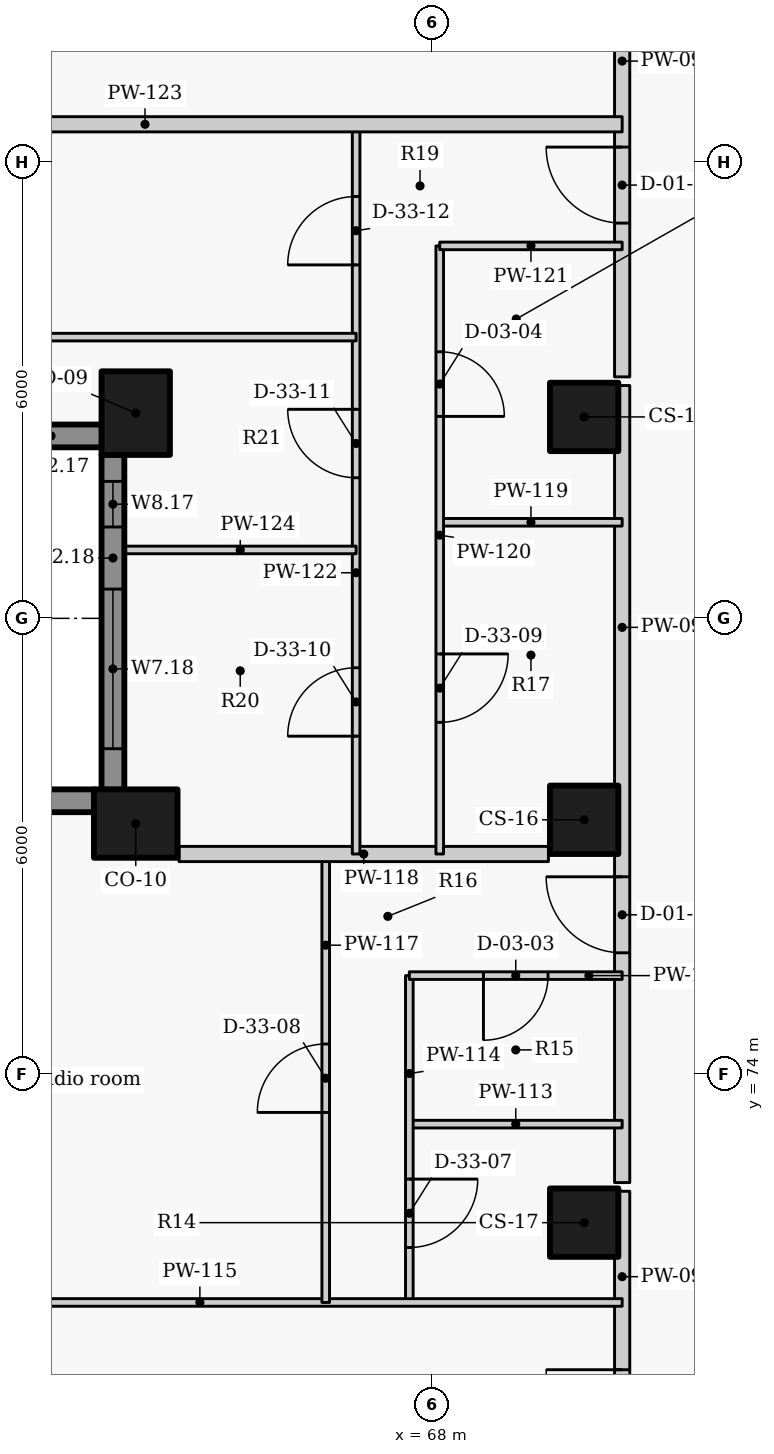
"""IFC4 building model, lengths in metres.
Left out: names, types, materials, properties, quantities, classifications, styles, units other than length and angle.
Written with IfcOpenShell. Run it as: python <this file> out.ifc"""

import sys

from ifc_helpers import new_model, si_unit, direction, frame, frame_2d, origin, origin_2d, place, context, subcontext, project, spatial, rectangle, extrude, element, fill, save


model = new_model("IFC4")
c1 = context("Model", 3, precision=1e-05, world=origin(), true_north=direction((0.0, 1.0)))
c2 = subcontext(c1, "Body", "Model", "MODEL_VIEW")
j1 = project(units=[si_unit("LENGTHUNIT", "METRE"), si_unit("PLANEANGLEUNIT", "RADIAN")], contexts=[c1])
p1 = place(None, origin())
s1 = spatial("IfcSite", under=j1, at=p1, CompositionType="ELEMENT")
p2 = place(p1, origin())
s2 = spatial("IfcBuilding", under=s1, at=p2, CompositionType="ELEMENT")
p3 = place(p2, frame((0.0, 0.0, 239.4)))
s3 = spatial("IfcBuildingStorey", under=s2, at=p3, CompositionType="ELEMENT", Elevation=239.4)
for number, where, z_axis, x_axis in (
    (1, (64.101, 82.7, 0.0), (0.0, 0.0, 1.0), (0.0, -1.0, 0.0)),
    (2, (64.101, 77.3, 0.0), (0.0, 0.0, 1.0), (-1.0, 0.0, 0.0)),
):
    element("IfcColumn", number, at=place(p3, frame(where, z_axis=z_axis, x_axis=x_axis)), inside=s3, PredefinedType="COLUMN", context=c2, shape_type="SweptSolid", body=[
        extrude(rectangle(XDim=1.1, YDim=0.9, at=origin_2d()), origin(), (0.0, 0.0, 1.0), 3.3),
    ])
for number, where, z_axis, x_axis in (
    (3, (70.0, 82.65, 0.0), (0.0, 0.0, 1.0), (0.0, -1.0, 0.0)),
    (4, (70.0, 77.35, 0.0), (0.0, 0.0, 1.0), (0.0, -1.0, 0.0)),
    (5, (70.0, 72.05, 0.0), (0.0, 0.0, 1.0), (0.0, -1.0, 0.0)),
):
    element("IfcColumn", number, at=place(p3, frame(where, z_axis=z_axis, x_axis=x_axis)), inside=s3, PredefinedType="COLUMN", context=c2, shape_type="SweptSolid", body=[
        extrude(rectangle(XDim=0.9, YDim=0.9, at=origin_2d()), origin(), (0.0, 0.0, 1.0), 3.3),
    ])
p4 = place(p3, frame((59.282, 82.4, 0.0), z_axis=(0.0, 0.0, 1.0), x_axis=(1.0, 0.0, 0.0)))
e6 = element("IfcWall", 6, at=p4, inside=s3, PredefinedType="SOLIDWALL", context=c2, shape_type="SweptSolid", body=[
    extrude(rectangle(XDim=4.373, YDim=0.3, at=frame_2d((2.186, 0.0))), origin(), (0.0, 0.0, 1.0), 2.425),
])
p5 = place(p4, frame((1.436, 0.0, 0.9)))
e7 = element("IfcOpeningElement", 7, at=p5, cuts=e6, PredefinedType="OPENING", context=c2, shape_type="SweptSolid", body=[
    extrude(rectangle(XDim=1.5, YDim=1.1, at=frame_2d((0.75, 0.55))), frame((0.0, 0.16, 0.0), z_axis=(0.0, -1.0, 0.0), x_axis=(1.0, 0.0, 0.0)), (0.0, 0.0, 1.0), 0.32),
])
p6 = place(p3, frame((63.801, 82.154, 0.0), z_axis=(0.0, 0.0, 1.0), x_axis=(0.0, -1.0, 0.0)))
e8 = element("IfcWall", 8, at=p6, inside=s3, PredefinedType="SOLIDWALL", context=c2, shape_type="SweptSolid", body=[
    extrude(rectangle(XDim=4.408, YDim=0.3, at=frame_2d((2.204, 0.0))), origin(), (0.0, 0.0, 1.0), 2.425),
])
p7 = place(p6, frame((0.352, 0.0, 0.9)))
e9 = element("IfcOpeningElement", 9, at=p7, cuts=e8, PredefinedType="OPENING", context=c2, shape_type="SweptSolid", body=[
    extrude(rectangle(XDim=0.6, YDim=1.1, at=frame_2d((0.3, 0.55))), frame((0.0, 0.16, 0.0), z_axis=(0.0, -1.0, 0.0), x_axis=(1.0, 0.0, 0.0)), (0.0, 0.0, 1.0), 0.32),
])
p8 = place(p6, frame((1.769, 0.0, 0.9)))
e10 = element("IfcOpeningElement", 10, at=p8, cuts=e8, PredefinedType="OPENING", context=c2, shape_type="SweptSolid", body=[
    extrude(rectangle(XDim=2.1, YDim=1.1, at=frame_2d((1.05, 0.55))), frame((0.0, 0.16, 0.0), z_axis=(0.0, -1.0, 0.0), x_axis=(1.0, 0.0, 0.0)), (0.0, 0.0, 1.0), 0.32),
])
p9 = place(p3, frame((63.554, 77.6, 0.0), z_axis=(0.0, 0.0, 1.0), x_axis=(-1.0, 0.0, 0.0)))
e11 = element("IfcWall", 11, at=p9, inside=s3, PredefinedType="SOLIDWALL", context=c2, shape_type="SweptSolid", body=[
    extrude(rectangle(XDim=4.272, YDim=0.3, at=frame_2d((2.136, 0.0))), origin(), (0.0, 0.0, 1.0), 2.425),
])
p10 = place(p3, frame((70.5, 68.227, 0.0), z_axis=(0.0, 0.0, 1.0), x_axis=(0.0, 1.0, 0.0)))
e12 = element("IfcWall", 12, at=p10, inside=s3, PredefinedType="PARTITIONING", context=c2, shape_type="SweptSolid", body=[
    extrude(rectangle(XDim=4.236, YDim=0.2, at=frame_2d((2.118, 0.0))), origin(), (0.0, 0.0, 1.0), 3.025),
])
p11 = place(p10, frame((0.888, 0.0, 0.0)))
e13 = element("IfcOpeningElement", 13, at=p11, cuts=e12, PredefinedType="OPENING", context=c2, shape_type="SweptSolid", body=[
    extrude(rectangle(XDim=1.0, YDim=2.1, at=frame_2d((0.5, 1.05))), frame((0.0, 0.11, 0.0), z_axis=(0.0, -1.0, 0.0), x_axis=(1.0, 0.0, 0.0)), (0.0, 0.0, 1.0), 0.22),
])
p12 = place(p3, frame((70.5, 72.577, 0.0), z_axis=(0.0, 0.0, 1.0), x_axis=(0.0, 1.0, 0.0)))
e14 = element("IfcWall", 14, at=p12, inside=s3, PredefinedType="PARTITIONING", context=c2, shape_type="SweptSolid", body=[
    extrude(rectangle(XDim=10.486, YDim=0.2, at=frame_2d((5.243, 0.0))), origin(), (0.0, 0.0, 1.0), 3.025),
])
p13 = place(p12, frame((3.023, 0.0, 0.0)))
e15 = element("IfcOpeningElement", 15, at=p13, cuts=e14, PredefinedType="OPENING", context=c2, shape_type="SweptSolid", body=[
    extrude(rectangle(XDim=1.0, YDim=2.1, at=frame_2d((0.5, 1.05))), frame((0.0, 0.11, 0.0), z_axis=(0.0, -1.0, 0.0), x_axis=(1.0, 0.0, 0.0)), (0.0, 0.0, 1.0), 0.22),
])
p14 = place(p3, frame((70.5, 83.177, 0.0), z_axis=(0.0, 0.0, 1.0), x_axis=(0.0, 1.0, 0.0)))
e16 = element("IfcWall", 16, at=p14, inside=s3, PredefinedType="PARTITIONING", context=c2, shape_type="SweptSolid", body=[
    extrude(rectangle(XDim=5.186, YDim=0.2, at=frame_2d((2.593, 0.0))), origin(), (0.0, 0.0, 1.0), 3.025),
])
p15 = place(p14, frame((2.023, 0.0, 0.0)))
e17 = element("IfcOpeningElement", 17, at=p15, cuts=e16, PredefinedType="OPENING", context=c2, shape_type="SweptSolid", body=[
    extrude(rectangle(XDim=1.0, YDim=2.1, at=frame_2d((0.5, 1.05))), frame((0.0, 0.11, 0.0), z_axis=(0.0, -1.0, 0.0), x_axis=(1.0, 0.0, 0.0)), (0.0, 0.0, 1.0), 0.22),
])
p16 = place(p3, frame((67.7, 73.346, 0.0), z_axis=(0.0, 0.0, 1.0), x_axis=(1.0, 0.0, 0.0)))
e18 = element("IfcWall", 18, at=p16, inside=s3, PredefinedType="PARTITIONING", context=c2, shape_type="SweptSolid", body=[
    extrude(rectangle(XDim=2.8, YDim=0.1, at=frame_2d((1.4, 0.0))), origin(), (0.0, 0.0, 1.0), 2.505),
])
p17 = place(p3, frame((67.7, 75.3, 0.0), z_axis=(0.0, 0.0, 1.0), x_axis=(0.0, -1.0, 0.0)))
e19 = element("IfcWall", 19, at=p17, inside=s3, PredefinedType="PARTITIONING", context=c2, shape_type="SweptSolid", body=[
    extrude(rectangle(XDim=4.3, YDim=0.1, at=frame_2d((2.15, 0.0))), origin(), (0.0, 0.0, 1.0), 3.025),
])
p18 = place(p17, frame((2.677, 0.0, 0.0)))
e20 = element("IfcOpeningElement", 20, at=p18, cuts=e19, PredefinedType="OPENING", context=c2, shape_type="SweptSolid", body=[
    extrude(rectangle(XDim=0.9, YDim=2.1, at=frame_2d((0.45, 1.05))), frame((0.0, 0.06, 0.0), z_axis=(0.0, -1.0, 0.0), x_axis=(1.0, 0.0, 0.0)), (0.0, 0.0, 1.0), 0.12),
])
p19 = place(p3, frame((59.389, 71.0, 0.0), z_axis=(0.0, 0.0, 1.0), x_axis=(1.0, 0.0, 0.0)))
e21 = element("IfcWall", 21, at=p19, inside=s3, PredefinedType="PARTITIONING", context=c2, shape_type="SweptSolid", body=[
    extrude(rectangle(XDim=11.111, YDim=0.1, at=frame_2d((5.556, 0.0))), origin(), (0.0, 0.0, 1.0), 2.405),
])
p20 = place(p3, frame((70.5, 75.3, 0.0), z_axis=(0.0, 0.0, 1.0), x_axis=(-1.0, 0.0, 0.0)))
e22 = element("IfcWall", 22, at=p20, inside=s3, PredefinedType="PARTITIONING", context=c2, shape_type="SweptSolid", body=[
    extrude(rectangle(XDim=2.8, YDim=0.1, at=frame_2d((1.4, 0.0))), origin(), (0.0, 0.0, 1.0), 2.505),
])
p21 = place(p20, frame((0.975, 0.0, 0.0)))
e23 = element("IfcOpeningElement", 23, at=p21, cuts=e22, PredefinedType="OPENING", context=c2, shape_type="SweptSolid", body=[
    extrude(rectangle(XDim=0.85, YDim=2.1, at=frame_2d((0.425, 1.05))), frame((0.0, 0.06, 0.0), z_axis=(0.0, -1.0, 0.0), x_axis=(1.0, 0.0, 0.0)), (0.0, 0.0, 1.0), 0.12),
])
p22 = place(p3, frame((66.6, 71.0, 0.0), z_axis=(0.0, 0.0, 1.0), x_axis=(0.0, 1.0, 0.0)))
e24 = element("IfcWall", 24, at=p22, inside=s3, PredefinedType="PARTITIONING", context=c2, shape_type="SweptSolid", body=[
    extrude(rectangle(XDim=5.9, YDim=0.1, at=frame_2d((2.95, 0.0))), origin(), (0.0, 0.0, 1.0), 3.025),
])
p23 = place(p22, frame((2.5, 0.0, 0.0)))
e25 = element("IfcOpeningElement", 25, at=p23, cuts=e24, PredefinedType="OPENING", context=c2, shape_type="SweptSolid", body=[
    extrude(rectangle(XDim=0.9, YDim=2.1, at=frame_2d((0.45, 1.05))), frame((0.0, 0.06, 0.0), z_axis=(0.0, -1.0, 0.0), x_axis=(1.0, 0.0, 0.0)), (0.0, 0.0, 1.0), 0.12),
])
p24 = place(p3, frame((64.67, 76.9, 0.0), z_axis=(0.0, 0.0, 1.0), x_axis=(1.0, 0.0, 0.0)))
e26 = element("IfcWall", 26, at=p24, inside=s3, PredefinedType="PARTITIONING", context=c2, shape_type="SweptSolid", body=[
    extrude(rectangle(XDim=4.86, YDim=0.2, at=frame_2d((2.43, 0.0))), origin(), (0.0, 0.0, 1.0), 3.025),
])
p25 = place(p3, frame((68.1, 81.264, 0.0), z_axis=(0.0, 0.0, 1.0), x_axis=(1.0, 0.0, 0.0)))
e27 = element("IfcWall", 27, at=p25, inside=s3, PredefinedType="PARTITIONING", context=c2, shape_type="SweptSolid", body=[
    extrude(rectangle(XDim=2.4, YDim=0.1, at=frame_2d((1.2, 0.0))), origin(), (0.0, 0.0, 1.0), 2.505),
])
p26 = place(p3, frame((68.1, 84.9, 0.0), z_axis=(0.0, 0.0, 1.0), x_axis=(0.0, -1.0, 0.0)))
e28 = element("IfcWall", 28, at=p26, inside=s3, PredefinedType="PARTITIONING", context=c2, shape_type="SweptSolid", body=[
    extrude(rectangle(XDim=8.0, YDim=0.1, at=frame_2d((4.0, 0.0))), origin(), (0.0, 0.0, 1.0), 3.025),
])
p27 = place(p26, frame((5.368, 0.0, 0.0)))
e29 = element("IfcOpeningElement", 29, at=p27, cuts=e28, PredefinedType="OPENING", context=c2, shape_type="SweptSolid", body=[
    extrude(rectangle(XDim=0.9, YDim=2.1, at=frame_2d((0.45, 1.05))), frame((0.0, 0.06, 0.0), z_axis=(0.0, -1.0, 0.0), x_axis=(1.0, 0.0, 0.0)), (0.0, 0.0, 1.0), 0.12),
])
p28 = place(p26, frame((1.393, 0.0, 0.0)))
e30 = element("IfcOpeningElement", 30, at=p28, cuts=e28, PredefinedType="OPENING", context=c2, shape_type="SweptSolid", body=[
    extrude(rectangle(XDim=0.85, YDim=2.1, at=frame_2d((0.425, 1.05))), frame((0.0, 0.06, 0.0), z_axis=(0.0, -1.0, 0.0), x_axis=(1.0, 0.0, 0.0)), (0.0, 0.0, 1.0), 0.12),
])
p29 = place(p3, frame((68.1, 84.9, 0.0), z_axis=(0.0, 0.0, 1.0), x_axis=(1.0, 0.0, 0.0)))
e31 = element("IfcWall", 31, at=p29, inside=s3, PredefinedType="PARTITIONING", context=c2, shape_type="SweptSolid", body=[
    extrude(rectangle(XDim=2.4, YDim=0.1, at=frame_2d((1.2, 0.0))), origin(), (0.0, 0.0, 1.0), 2.505),
])
p30 = place(p3, frame((67.0, 76.9, 0.0), z_axis=(0.0, 0.0, 1.0), x_axis=(0.0, 1.0, 0.0)))
e32 = element("IfcWall", 32, at=p30, inside=s3, PredefinedType="PARTITIONING", context=c2, shape_type="SweptSolid", body=[
    extrude(rectangle(XDim=9.6, YDim=0.1, at=frame_2d((4.8, 0.0))), origin(), (0.0, 0.0, 1.0), 3.025),
])
p31 = place(p30, frame((1.55, 0.0, 0.0)))
e33 = element("IfcOpeningElement", 33, at=p31, cuts=e32, PredefinedType="OPENING", context=c2, shape_type="SweptSolid", body=[
    extrude(rectangle(XDim=0.9, YDim=2.1, at=frame_2d((0.45, 1.05))), frame((0.0, 0.06, 0.0), z_axis=(0.0, -1.0, 0.0), x_axis=(1.0, 0.0, 0.0)), (0.0, 0.0, 1.0), 0.12),
])
p32 = place(p30, frame((4.95, 0.0, 0.0)))
e34 = element("IfcOpeningElement", 34, at=p32, cuts=e32, PredefinedType="OPENING", context=c2, shape_type="SweptSolid", body=[
    extrude(rectangle(XDim=0.9, YDim=2.1, at=frame_2d((0.45, 1.05))), frame((0.0, 0.06, 0.0), z_axis=(0.0, -1.0, 0.0), x_axis=(1.0, 0.0, 0.0)), (0.0, 0.0, 1.0), 0.12),
])
p33 = place(p30, frame((7.75, 0.0, 0.0)))
e35 = element("IfcOpeningElement", 35, at=p33, cuts=e32, PredefinedType="OPENING", context=c2, shape_type="SweptSolid", body=[
    extrude(rectangle(XDim=0.9, YDim=2.1, at=frame_2d((0.45, 1.05))), frame((0.0, 0.06, 0.0), z_axis=(0.0, -1.0, 0.0), x_axis=(1.0, 0.0, 0.0)), (0.0, 0.0, 1.0), 0.12),
])
p34 = place(p3, frame((57.945, 86.5, 0.0), z_axis=(0.0, 0.0, 1.0), x_axis=(1.0, 0.0, 0.0)))
e36 = element("IfcWall", 36, at=p34, inside=s3, PredefinedType="PARTITIONING", context=c2, shape_type="SweptSolid", body=[
    extrude(rectangle(XDim=12.555, YDim=0.2, at=frame_2d((6.277, 0.0))), origin(), (0.0, 0.0, 1.0), 2.405),
])
p35 = place(p3, frame((63.95, 80.9, 0.0), z_axis=(0.0, 0.0, 1.0), x_axis=(1.0, 0.0, 0.0)))
e37 = element("IfcWall", 37, at=p35, inside=s3, PredefinedType="PARTITIONING", context=c2, shape_type="SweptSolid", body=[
    extrude(rectangle(XDim=3.05, YDim=0.1, at=frame_2d((1.525, 0.0))), origin(), (0.0, 0.0, 1.0), 2.405),
])
p36 = place(p3, frame((56.329, 83.7, 0.0), z_axis=(0.0, 0.0, 1.0), x_axis=(1.0, 0.0, 0.0)))
e38 = element("IfcWall", 38, at=p36, inside=s3, PredefinedType="PARTITIONING", context=c2, shape_type="SweptSolid", body=[
    extrude(rectangle(XDim=10.671, YDim=0.1, at=frame_2d((5.336, 0.0))), origin(), (0.0, 0.0, 1.0), 2.405),
])
p37 = place(p7, origin())
e39 = element("IfcWindow", 39, at=p37, inside=s3, PartitioningType="SINGLE_PANEL", PredefinedType="WINDOW", context=c2, shape_type="SweptSolid", body=[
    extrude(rectangle(XDim=0.6, YDim=1.1, at=frame_2d((0.3, 0.55))), frame((0.0, 0.03, 0.0), z_axis=(0.0, -1.0, 0.0), x_axis=(1.0, 0.0, 0.0)), (0.0, 0.0, 1.0), 0.06),
])
fill(e9, e39)
p38 = place(p8, origin())
e40 = element("IfcWindow", 40, at=p38, inside=s3, PartitioningType="SINGLE_PANEL", PredefinedType="WINDOW", context=c2, shape_type="SweptSolid", body=[
    extrude(rectangle(XDim=2.1, YDim=1.1, at=frame_2d((1.05, 0.55))), frame((0.0, 0.03, 0.0), z_axis=(0.0, -1.0, 0.0), x_axis=(1.0, 0.0, 0.0)), (0.0, 0.0, 1.0), 0.06),
])
fill(e10, e40)
p39 = place(p13, origin())
e41 = element("IfcDoor", 41, at=p39, inside=s3, OperationType="SINGLE_SWING_RIGHT", PredefinedType="DOOR", context=c2, shape_type="SweptSolid", body=[
    extrude(rectangle(XDim=1.0, YDim=2.1, at=frame_2d((0.5, 1.05))), frame((0.0, 0.025, 0.0), z_axis=(0.0, -1.0, 0.0), x_axis=(1.0, 0.0, 0.0)), (0.0, 0.0, 1.0), 0.05),
])
fill(e15, e41)
p40 = place(p18, origin())
e42 = element("IfcDoor", 42, at=p40, inside=s3, OperationType="SINGLE_SWING_LEFT", PredefinedType="DOOR", context=c2, shape_type="SweptSolid", body=[
    extrude(rectangle(XDim=0.9, YDim=2.1, at=frame_2d((0.45, 1.05))), frame((0.0, 0.025, 0.0), z_axis=(0.0, -1.0, 0.0), x_axis=(1.0, 0.0, 0.0)), (0.0, 0.0, 1.0), 0.05),
])
fill(e20, e42)
p41 = place(p21, origin())
e43 = element("IfcDoor", 43, at=p41, inside=s3, OperationType="SINGLE_SWING_RIGHT", PredefinedType="DOOR", context=c2, shape_type="SweptSolid", body=[
    extrude(rectangle(XDim=0.85, YDim=2.1, at=frame_2d((0.425, 1.05))), frame((0.0, 0.025, 0.0), z_axis=(0.0, -1.0, 0.0), x_axis=(1.0, 0.0, 0.0)), (0.0, 0.0, 1.0), 0.05),
])
fill(e23, e43)
p42 = place(p23, origin())
e44 = element("IfcDoor", 44, at=p42, inside=s3, OperationType="SINGLE_SWING_LEFT", PredefinedType="DOOR", context=c2, shape_type="SweptSolid", body=[
    extrude(rectangle(XDim=0.9, YDim=2.1, at=frame_2d((0.45, 1.05))), frame((0.0, 0.025, 0.0), z_axis=(0.0, -1.0, 0.0), x_axis=(1.0, 0.0, 0.0)), (0.0, 0.0, 1.0), 0.05),
])
fill(e25, e44)
p43 = place(p15, origin())
e45 = element("IfcDoor", 45, at=p43, inside=s3, OperationType="SINGLE_SWING_RIGHT", PredefinedType="DOOR", context=c2, shape_type="SweptSolid", body=[
    extrude(rectangle(XDim=1.0, YDim=2.1, at=frame_2d((0.5, 1.05))), frame((0.0, 0.025, 0.0), z_axis=(0.0, -1.0, 0.0), x_axis=(1.0, 0.0, 0.0)), (0.0, 0.0, 1.0), 0.05),
])
fill(e17, e45)
p44 = place(p27, origin())
e46 = element("IfcDoor", 46, at=p44, inside=s3, OperationType="SINGLE_SWING_LEFT", PredefinedType="DOOR", context=c2, shape_type="SweptSolid", body=[
    extrude(rectangle(XDim=0.9, YDim=2.1, at=frame_2d((0.45, 1.05))), frame((0.0, 0.025, 0.0), z_axis=(0.0, -1.0, 0.0), x_axis=(1.0, 0.0, 0.0)), (0.0, 0.0, 1.0), 0.05),
])
fill(e29, e46)
p45 = place(p28, origin())
e47 = element("IfcDoor", 47, at=p45, inside=s3, OperationType="SINGLE_SWING_RIGHT", PredefinedType="DOOR", context=c2, shape_type="SweptSolid", body=[
    extrude(rectangle(XDim=0.85, YDim=2.1, at=frame_2d((0.425, 1.05))), frame((0.0, 0.025, 0.0), z_axis=(0.0, -1.0, 0.0), x_axis=(1.0, 0.0, 0.0)), (0.0, 0.0, 1.0), 0.05),
])
fill(e30, e47)
p46 = place(p31, origin())
e48 = element("IfcDoor", 48, at=p46, inside=s3, OperationType="SINGLE_SWING_LEFT", PredefinedType="DOOR", context=c2, shape_type="SweptSolid", body=[
    extrude(rectangle(XDim=0.9, YDim=2.1, at=frame_2d((0.45, 1.05))), frame((0.0, 0.025, 0.0), z_axis=(0.0, -1.0, 0.0), x_axis=(1.0, 0.0, 0.0)), (0.0, 0.0, 1.0), 0.05),
])
fill(e33, e48)
p47 = place(p32, origin())
e49 = element("IfcDoor", 49, at=p47, inside=s3, OperationType="SINGLE_SWING_RIGHT", PredefinedType="DOOR", context=c2, shape_type="SweptSolid", body=[
    extrude(rectangle(XDim=0.9, YDim=2.1, at=frame_2d((0.45, 1.05))), frame((0.0, 0.025, 0.0), z_axis=(0.0, -1.0, 0.0), x_axis=(1.0, 0.0, 0.0)), (0.0, 0.0, 1.0), 0.05),
])
fill(e34, e49)
p48 = place(p33, origin())
e50 = element("IfcDoor", 50, at=p48, inside=s3, OperationType="SINGLE_SWING_LEFT", PredefinedType="DOOR", context=c2, shape_type="SweptSolid", body=[
    extrude(rectangle(XDim=0.9, YDim=2.1, at=frame_2d((0.45, 1.05))), frame((0.0, 0.025, 0.0), z_axis=(0.0, -1.0, 0.0), x_axis=(1.0, 0.0, 0.0)), (0.0, 0.0, 1.0), 0.05),
])
fill(e35, e50)
p49 = place(p11, origin())
e51 = element("IfcDoor", 51, at=p49, inside=s3, OperationType="SINGLE_SWING_RIGHT", PredefinedType="DOOR", context=c2, shape_type="SweptSolid", body=[
    extrude(rectangle(XDim=1.0, YDim=2.1, at=frame_2d((0.5, 1.05))), frame((0.0, 0.025, 0.0), z_axis=(0.0, -1.0, 0.0), x_axis=(1.0, 0.0, 0.0)), (0.0, 0.0, 1.0), 0.05),
])
fill(e13, e51)
save(model, sys.argv[1])
